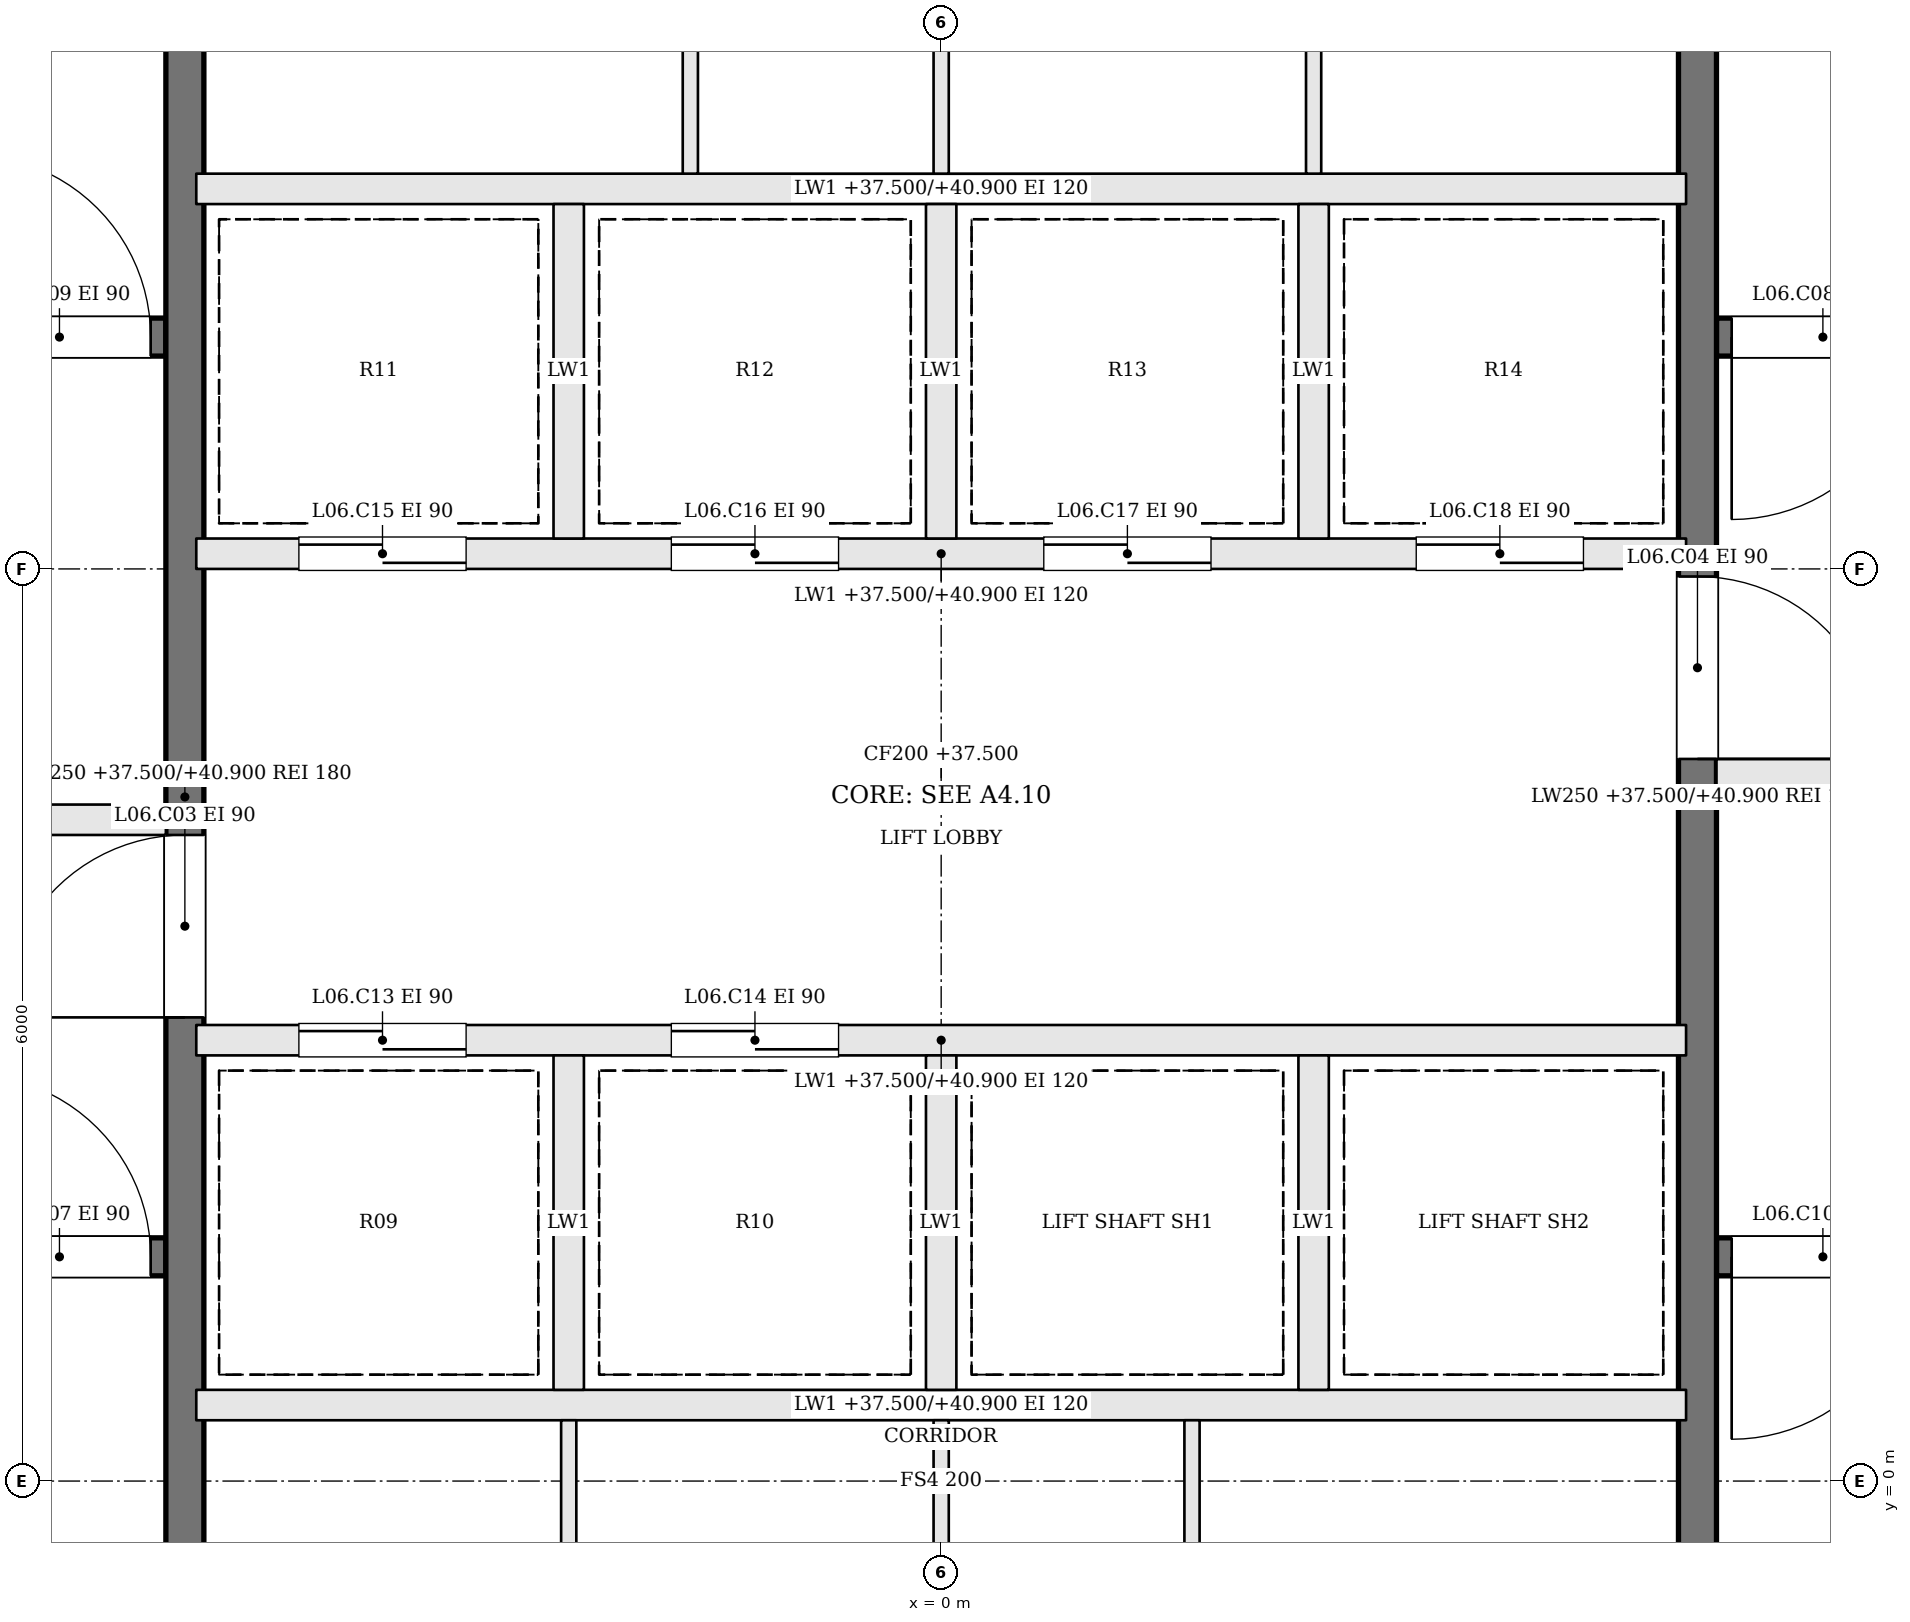
"""IFC4 building model, lengths in metres.
Left out: names, types, materials, properties, quantities, classifications, styles, units other than length and angle.
Written with IfcOpenShell. Run it as: python <this file> out.ifc"""

import sys

from ifc_helpers import new_model, si_unit, direction, frame, frame_2d, origin, place, context, subcontext, project, spatial, rectangle, extrude, element, fill, save


model = new_model("IFC4")
c1 = context("Model", 3, precision=1e-05, world=origin(), true_north=direction((0.0, 1.0)))
c2 = subcontext(c1, "Body", "Model", "MODEL_VIEW")
j1 = project(units=[si_unit("LENGTHUNIT", "METRE"), si_unit("PLANEANGLEUNIT", "RADIAN")], contexts=[c1])
p1 = place(None, origin())
s1 = spatial("IfcSite", under=j1, at=p1, CompositionType="ELEMENT")
p2 = place(p1, origin())
s2 = spatial("IfcBuilding", under=s1, at=p2, CompositionType="ELEMENT")
p3 = place(p2, frame((0.0, 0.0, 37.5)))
s3 = spatial("IfcBuildingStorey", under=s2, at=p3, CompositionType="ELEMENT", Elevation=37.5)
p4 = place(p3, frame((-11.6, 1.475, 0.0), z_axis=(0.0, 0.0, 1.0), x_axis=(1.0, 0.0, 0.0)))
e1 = element("IfcWall", 1, at=p4, inside=s3, PredefinedType="SOLIDWALL", context=c2, shape_type="SweptSolid", body=[
    extrude(rectangle(XDim=6.5, YDim=0.25, at=frame_2d((3.25, 0.0))), origin(), (0.0, 0.0, 1.0), 3.4),
])
p5 = place(p4, frame((5.2, 0.0, 0.0)))
e2 = element("IfcOpeningElement", 2, at=p5, cuts=e1, PredefinedType="OPENING", context=c2, shape_type="SweptSolid", body=[
    extrude(rectangle(XDim=1.2, YDim=2.1, at=frame_2d((0.6, 1.05))), frame((0.0, 0.135, 0.0), z_axis=(0.0, -1.0, 0.0), x_axis=(1.0, 0.0, 0.0)), (0.0, 0.0, 1.0), 0.27),
])
p6 = place(p3, frame((11.6, 7.525, 0.0), z_axis=(0.0, 0.0, 1.0), x_axis=(-1.0, 0.0, 0.0)))
e3 = element("IfcWall", 3, at=p6, inside=s3, PredefinedType="SOLIDWALL", context=c2, shape_type="SweptSolid", body=[
    extrude(rectangle(XDim=6.5, YDim=0.25, at=frame_2d((3.25, 0.0))), origin(), (0.0, 0.0, 1.0), 3.4),
])
p7 = place(p6, frame((5.2, 0.0, 0.0)))
e4 = element("IfcOpeningElement", 4, at=p7, cuts=e3, PredefinedType="OPENING", context=c2, shape_type="SweptSolid", body=[
    extrude(rectangle(XDim=1.2, YDim=2.1, at=frame_2d((0.6, 1.05))), frame((0.0, 0.135, 0.0), z_axis=(0.0, -1.0, 0.0), x_axis=(1.0, 0.0, 0.0)), (0.0, 0.0, 1.0), 0.27),
])
p8 = place(p3, frame((-11.6, 4.35, 0.0), z_axis=(0.0, 0.0, 1.0), x_axis=(1.0, 0.0, 0.0)))
e5 = element("IfcWall", 5, at=p8, inside=s3, PredefinedType="SOLIDWALL", context=c2, shape_type="SweptSolid", body=[
    extrude(rectangle(XDim=6.5, YDim=0.2, at=frame_2d((3.25, 0.0))), origin(), (0.0, 0.0, 1.0), 3.4),
])
p9 = place(p8, frame((3.8, 0.0, 0.0)))
e6 = element("IfcOpeningElement", 6, at=p9, cuts=e5, PredefinedType="OPENING", context=c2, shape_type="SweptSolid", body=[
    extrude(rectangle(XDim=1.2, YDim=2.1, at=frame_2d((0.6, 1.05))), frame((0.0, 0.11, 0.0), z_axis=(0.0, -1.0, 0.0), x_axis=(1.0, 0.0, 0.0)), (0.0, 0.0, 1.0), 0.22),
])
p10 = place(p8, frame((0.5, 0.0, 0.0)))
e7 = element("IfcOpeningElement", 7, at=p10, cuts=e5, PredefinedType="OPENING", context=c2, shape_type="SweptSolid", body=[
    extrude(rectangle(XDim=1.2, YDim=2.1, at=frame_2d((0.6, 1.05))), frame((0.0, 0.11, 0.0), z_axis=(0.0, -1.0, 0.0), x_axis=(1.0, 0.0, 0.0)), (0.0, 0.0, 1.0), 0.22),
])
p11 = place(p3, frame((11.6, 4.65, 0.0), z_axis=(0.0, 0.0, 1.0), x_axis=(-1.0, 0.0, 0.0)))
e8 = element("IfcWall", 8, at=p11, inside=s3, PredefinedType="SOLIDWALL", context=c2, shape_type="SweptSolid", body=[
    extrude(rectangle(XDim=6.5, YDim=0.2, at=frame_2d((3.25, 0.0))), origin(), (0.0, 0.0, 1.0), 3.4),
])
p12 = place(p11, frame((3.8, 0.0, 0.0)))
e9 = element("IfcOpeningElement", 9, at=p12, cuts=e8, PredefinedType="OPENING", context=c2, shape_type="SweptSolid", body=[
    extrude(rectangle(XDim=1.2, YDim=2.1, at=frame_2d((0.6, 1.05))), frame((0.0, 0.11, 0.0), z_axis=(0.0, -1.0, 0.0), x_axis=(1.0, 0.0, 0.0)), (0.0, 0.0, 1.0), 0.22),
])
p13 = place(p11, frame((0.5, 0.0, 0.0)))
e10 = element("IfcOpeningElement", 10, at=p13, cuts=e8, PredefinedType="OPENING", context=c2, shape_type="SweptSolid", body=[
    extrude(rectangle(XDim=1.2, YDim=2.1, at=frame_2d((0.6, 1.05))), frame((0.0, 0.11, 0.0), z_axis=(0.0, -1.0, 0.0), x_axis=(1.0, 0.0, 0.0)), (0.0, 0.0, 1.0), 0.22),
])
p14 = place(p3, frame((-11.6, 7.525, 0.0), z_axis=(0.0, 0.0, 1.0), x_axis=(1.0, 0.0, 0.0)))
e11 = element("IfcWall", 11, at=p14, inside=s3, PredefinedType="SOLIDWALL", context=c2, shape_type="SweptSolid", body=[
    extrude(rectangle(XDim=6.5, YDim=0.25, at=frame_2d((3.25, 0.0))), origin(), (0.0, 0.0, 1.0), 3.4),
])
p15 = place(p14, frame((5.2, 0.0, 0.0)))
e12 = element("IfcOpeningElement", 12, at=p15, cuts=e11, PredefinedType="OPENING", context=c2, shape_type="SweptSolid", body=[
    extrude(rectangle(XDim=1.2, YDim=2.1, at=frame_2d((0.6, 1.05))), frame((0.0, 0.135, 0.0), z_axis=(0.0, -1.0, 0.0), x_axis=(1.0, 0.0, 0.0)), (0.0, 0.0, 1.0), 0.27),
])
p16 = place(p3, frame((11.6, 1.475, 0.0), z_axis=(0.0, 0.0, 1.0), x_axis=(-1.0, 0.0, 0.0)))
e13 = element("IfcWall", 13, at=p16, inside=s3, PredefinedType="SOLIDWALL", context=c2, shape_type="SweptSolid", body=[
    extrude(rectangle(XDim=6.5, YDim=0.25, at=frame_2d((3.25, 0.0))), origin(), (0.0, 0.0, 1.0), 3.4),
])
p17 = place(p16, frame((5.2, 0.0, 0.0)))
e14 = element("IfcOpeningElement", 14, at=p17, cuts=e13, PredefinedType="OPENING", context=c2, shape_type="SweptSolid", body=[
    extrude(rectangle(XDim=1.2, YDim=2.1, at=frame_2d((0.6, 1.05))), frame((0.0, 0.135, 0.0), z_axis=(0.0, -1.0, 0.0), x_axis=(1.0, 0.0, 0.0)), (0.0, 0.0, 1.0), 0.27),
])
p18 = place(p3, frame((-4.975, -1.6, 0.0), z_axis=(0.0, 0.0, 1.0), x_axis=(0.0, 1.0, 0.0)))
e15 = element("IfcWall", 15, at=p18, inside=s3, PredefinedType="SOLIDWALL", context=c2, shape_type="SweptSolid", body=[
    extrude(rectangle(XDim=12.2, YDim=0.25, at=frame_2d((6.1, 0.0))), origin(), (0.0, 0.0, 1.0), 3.4),
])
p19 = place(p18, frame((4.65, 0.0, 0.0)))
e16 = element("IfcOpeningElement", 16, at=p19, cuts=e15, PredefinedType="OPENING", context=c2, shape_type="SweptSolid", body=[
    extrude(rectangle(XDim=1.2, YDim=2.1, at=frame_2d((0.6, 1.05))), frame((0.0, 0.135, 0.0), z_axis=(0.0, -1.0, 0.0), x_axis=(1.0, 0.0, 0.0)), (0.0, 0.0, 1.0), 0.27),
])
p20 = place(p3, frame((4.975, 10.6, 0.0), z_axis=(0.0, 0.0, 1.0), x_axis=(0.0, -1.0, 0.0)))
e17 = element("IfcWall", 17, at=p20, inside=s3, PredefinedType="SOLIDWALL", context=c2, shape_type="SweptSolid", body=[
    extrude(rectangle(XDim=12.2, YDim=0.25, at=frame_2d((6.1, 0.0))), origin(), (0.0, 0.0, 1.0), 3.4),
])
p21 = place(p20, frame((4.65, 0.0, 0.0)))
e18 = element("IfcOpeningElement", 18, at=p21, cuts=e17, PredefinedType="OPENING", context=c2, shape_type="SweptSolid", body=[
    extrude(rectangle(XDim=1.2, YDim=2.1, at=frame_2d((0.6, 1.05))), frame((0.0, 0.135, 0.0), z_axis=(0.0, -1.0, 0.0), x_axis=(1.0, 0.0, 0.0)), (0.0, 0.0, 1.0), 0.27),
])
p22 = place(p3, frame((-4.9, 0.5, 0.0), z_axis=(0.0, 0.0, 1.0), x_axis=(1.0, 0.0, 0.0)))
e19 = element("IfcWall", 19, at=p22, inside=s3, PredefinedType="SOLIDWALL", context=c2, shape_type="SweptSolid", body=[
    extrude(rectangle(XDim=9.8, YDim=0.2, at=frame_2d((4.9, 0.0))), origin(), (0.0, 0.0, 1.0), 3.4),
])
p23 = place(p3, frame((-4.9, 2.9, 0.0), z_axis=(0.0, 0.0, 1.0), x_axis=(1.0, 0.0, 0.0)))
e20 = element("IfcWall", 20, at=p23, inside=s3, PredefinedType="SOLIDWALL", context=c2, shape_type="SweptSolid", body=[
    extrude(rectangle(XDim=9.8, YDim=0.2, at=frame_2d((4.9, 0.0))), origin(), (0.0, 0.0, 1.0), 3.4),
])
p24 = place(p23, frame((0.675, 0.0, 0.0)))
e21 = element("IfcOpeningElement", 21, at=p24, cuts=e20, PredefinedType="OPENING", context=c2, shape_type="SweptSolid", body=[
    extrude(rectangle(XDim=1.1, YDim=2.1, at=frame_2d((0.55, 1.05))), frame((0.0, 0.11, 0.0), z_axis=(0.0, -1.0, 0.0), x_axis=(1.0, 0.0, 0.0)), (0.0, 0.0, 1.0), 0.22),
])
p25 = place(p23, frame((3.125, 0.0, 0.0)))
e22 = element("IfcOpeningElement", 22, at=p25, cuts=e20, PredefinedType="OPENING", context=c2, shape_type="SweptSolid", body=[
    extrude(rectangle(XDim=1.1, YDim=2.1, at=frame_2d((0.55, 1.05))), frame((0.0, 0.11, 0.0), z_axis=(0.0, -1.0, 0.0), x_axis=(1.0, 0.0, 0.0)), (0.0, 0.0, 1.0), 0.22),
])
p26 = place(p3, frame((-4.9, 6.1, 0.0), z_axis=(0.0, 0.0, 1.0), x_axis=(1.0, 0.0, 0.0)))
e23 = element("IfcWall", 23, at=p26, inside=s3, PredefinedType="SOLIDWALL", context=c2, shape_type="SweptSolid", body=[
    extrude(rectangle(XDim=9.8, YDim=0.2, at=frame_2d((4.9, 0.0))), origin(), (0.0, 0.0, 1.0), 3.4),
])
p27 = place(p26, frame((0.675, 0.0, 0.0)))
e24 = element("IfcOpeningElement", 24, at=p27, cuts=e23, PredefinedType="OPENING", context=c2, shape_type="SweptSolid", body=[
    extrude(rectangle(XDim=1.1, YDim=2.1, at=frame_2d((0.55, 1.05))), frame((0.0, 0.11, 0.0), z_axis=(0.0, -1.0, 0.0), x_axis=(1.0, 0.0, 0.0)), (0.0, 0.0, 1.0), 0.22),
])
p28 = place(p26, frame((3.125, 0.0, 0.0)))
e25 = element("IfcOpeningElement", 25, at=p28, cuts=e23, PredefinedType="OPENING", context=c2, shape_type="SweptSolid", body=[
    extrude(rectangle(XDim=1.1, YDim=2.1, at=frame_2d((0.55, 1.05))), frame((0.0, 0.11, 0.0), z_axis=(0.0, -1.0, 0.0), x_axis=(1.0, 0.0, 0.0)), (0.0, 0.0, 1.0), 0.22),
])
p29 = place(p26, frame((5.575, 0.0, 0.0)))
e26 = element("IfcOpeningElement", 26, at=p29, cuts=e23, PredefinedType="OPENING", context=c2, shape_type="SweptSolid", body=[
    extrude(rectangle(XDim=1.1, YDim=2.1, at=frame_2d((0.55, 1.05))), frame((0.0, 0.11, 0.0), z_axis=(0.0, -1.0, 0.0), x_axis=(1.0, 0.0, 0.0)), (0.0, 0.0, 1.0), 0.22),
])
p30 = place(p26, frame((8.025, 0.0, 0.0)))
e27 = element("IfcOpeningElement", 27, at=p30, cuts=e23, PredefinedType="OPENING", context=c2, shape_type="SweptSolid", body=[
    extrude(rectangle(XDim=1.1, YDim=2.1, at=frame_2d((0.55, 1.05))), frame((0.0, 0.11, 0.0), z_axis=(0.0, -1.0, 0.0), x_axis=(1.0, 0.0, 0.0)), (0.0, 0.0, 1.0), 0.22),
])
p31 = place(p3, frame((-4.9, 8.5, 0.0), z_axis=(0.0, 0.0, 1.0), x_axis=(1.0, 0.0, 0.0)))
e28 = element("IfcWall", 28, at=p31, inside=s3, PredefinedType="SOLIDWALL", context=c2, shape_type="SweptSolid", body=[
    extrude(rectangle(XDim=9.8, YDim=0.2, at=frame_2d((4.9, 0.0))), origin(), (0.0, 0.0, 1.0), 3.4),
])
for number, where, z_axis, x_axis in (
    (29, (-2.45, 0.6, 0.0), (0.0, 0.0, 1.0), (0.0, 1.0, 0.0)),
    (30, (0.0, 0.6, 0.0), (0.0, 0.0, 1.0), (0.0, 1.0, 0.0)),
    (31, (2.45, 0.6, 0.0), (0.0, 0.0, 1.0), (0.0, 1.0, 0.0)),
    (32, (-2.45, 6.2, 0.0), (0.0, 0.0, 1.0), (0.0, 1.0, 0.0)),
    (33, (0.0, 6.2, 0.0), (0.0, 0.0, 1.0), (0.0, 1.0, 0.0)),
    (34, (2.45, 6.2, 0.0), (0.0, 0.0, 1.0), (0.0, 1.0, 0.0)),
):
    element("IfcWall", number, at=place(p3, frame(where, z_axis=z_axis, x_axis=x_axis)), inside=s3, PredefinedType="SOLIDWALL", context=c2, shape_type="SweptSolid", body=[
        extrude(rectangle(XDim=2.2, YDim=0.2, at=frame_2d((1.1, 0.0))), origin(), (0.0, 0.0, 1.0), 3.4),
    ])
for number, where, z_axis, x_axis in (
    (35, (-2.45, -1.6, 0.0), (0.0, 0.0, 1.0), (0.0, 1.0, 0.0)),
    (36, (0.0, -1.6, 0.0), (0.0, 0.0, 1.0), (0.0, 1.0, 0.0)),
    (37, (1.65, -1.6, 0.0), (0.0, 0.0, 1.0), (0.0, 1.0, 0.0)),
    (38, (-1.65, 8.6, 0.0), (0.0, 0.0, 1.0), (0.0, 1.0, 0.0)),
    (39, (0.0, 8.6, 0.0), (0.0, 0.0, 1.0), (0.0, 1.0, 0.0)),
    (40, (2.45, 8.6, 0.0), (0.0, 0.0, 1.0), (0.0, 1.0, 0.0)),
):
    element("IfcWall", number, at=place(p3, frame(where, z_axis=z_axis, x_axis=x_axis)), inside=s3, PredefinedType="PARTITIONING", context=c2, shape_type="SweptSolid", body=[
        extrude(rectangle(XDim=2.0, YDim=0.1, at=frame_2d((1.0, 0.0))), origin(), (0.0, 0.0, 1.0), 3.4),
    ])
p32 = place(p19, origin())
e41 = element("IfcDoor", 41, at=p32, inside=s3, OperationType="SINGLE_SWING_LEFT", PredefinedType="DOOR", context=c2, shape_type="SweptSolid", body=[
    extrude(rectangle(XDim=1.2, YDim=2.1, at=frame_2d((0.6, 1.05))), frame((0.0, 0.025, 0.0), z_axis=(0.0, -1.0, 0.0), x_axis=(1.0, 0.0, 0.0)), (0.0, 0.0, 1.0), 0.05),
])
fill(e16, e41)
p33 = place(p21, origin())
e42 = element("IfcDoor", 42, at=p33, inside=s3, OperationType="SINGLE_SWING_RIGHT", PredefinedType="DOOR", context=c2, shape_type="SweptSolid", body=[
    extrude(rectangle(XDim=1.2, YDim=2.1, at=frame_2d((0.6, 1.05))), frame((0.0, 0.025, 0.0), z_axis=(0.0, -1.0, 0.0), x_axis=(1.0, 0.0, 0.0)), (0.0, 0.0, 1.0), 0.05),
])
fill(e18, e42)
p34 = place(p5, origin())
e43 = element("IfcDoor", 43, at=p34, inside=s3, OperationType="SINGLE_SWING_LEFT", PredefinedType="DOOR", context=c2, shape_type="SweptSolid", body=[
    extrude(rectangle(XDim=1.2, YDim=2.1, at=frame_2d((0.6, 1.05))), frame((0.0, 0.025, 0.0), z_axis=(0.0, -1.0, 0.0), x_axis=(1.0, 0.0, 0.0)), (0.0, 0.0, 1.0), 0.05),
])
fill(e2, e43)
p35 = place(p7, origin())
e44 = element("IfcDoor", 44, at=p35, inside=s3, OperationType="SINGLE_SWING_RIGHT", PredefinedType="DOOR", context=c2, shape_type="SweptSolid", body=[
    extrude(rectangle(XDim=1.2, YDim=2.1, at=frame_2d((0.6, 1.05))), frame((0.0, 0.025, 0.0), z_axis=(0.0, -1.0, 0.0), x_axis=(1.0, 0.0, 0.0)), (0.0, 0.0, 1.0), 0.05),
])
fill(e4, e44)
p36 = place(p15, origin())
e45 = element("IfcDoor", 45, at=p36, inside=s3, OperationType="SINGLE_SWING_LEFT", PredefinedType="DOOR", context=c2, shape_type="SweptSolid", body=[
    extrude(rectangle(XDim=1.2, YDim=2.1, at=frame_2d((0.6, 1.05))), frame((0.0, 0.025, 0.0), z_axis=(0.0, -1.0, 0.0), x_axis=(1.0, 0.0, 0.0)), (0.0, 0.0, 1.0), 0.05),
])
fill(e12, e45)
p37 = place(p17, origin())
e46 = element("IfcDoor", 46, at=p37, inside=s3, OperationType="SINGLE_SWING_RIGHT", PredefinedType="DOOR", context=c2, shape_type="SweptSolid", body=[
    extrude(rectangle(XDim=1.2, YDim=2.1, at=frame_2d((0.6, 1.05))), frame((0.0, 0.025, 0.0), z_axis=(0.0, -1.0, 0.0), x_axis=(1.0, 0.0, 0.0)), (0.0, 0.0, 1.0), 0.05),
])
fill(e14, e46)
p38 = place(p24, origin())
e47 = element("IfcDoor", 47, at=p38, inside=s3, OperationType="SLIDING_TO_RIGHT", PredefinedType="DOOR", context=c2, shape_type="SweptSolid", body=[
    extrude(rectangle(XDim=1.1, YDim=2.1, at=frame_2d((0.55, 1.05))), frame((0.0, 0.025, 0.0), z_axis=(0.0, -1.0, 0.0), x_axis=(1.0, 0.0, 0.0)), (0.0, 0.0, 1.0), 0.05),
])
fill(e21, e47)
p39 = place(p25, origin())
e48 = element("IfcDoor", 48, at=p39, inside=s3, OperationType="SLIDING_TO_LEFT", PredefinedType="DOOR", context=c2, shape_type="SweptSolid", body=[
    extrude(rectangle(XDim=1.1, YDim=2.1, at=frame_2d((0.55, 1.05))), frame((0.0, 0.025, 0.0), z_axis=(0.0, -1.0, 0.0), x_axis=(1.0, 0.0, 0.0)), (0.0, 0.0, 1.0), 0.05),
])
fill(e22, e48)
p40 = place(p27, origin())
e49 = element("IfcDoor", 49, at=p40, inside=s3, OperationType="SLIDING_TO_RIGHT", PredefinedType="DOOR", context=c2, shape_type="SweptSolid", body=[
    extrude(rectangle(XDim=1.1, YDim=2.1, at=frame_2d((0.55, 1.05))), frame((0.0, 0.025, 0.0), z_axis=(0.0, -1.0, 0.0), x_axis=(1.0, 0.0, 0.0)), (0.0, 0.0, 1.0), 0.05),
])
fill(e24, e49)
p41 = place(p28, origin())
e50 = element("IfcDoor", 50, at=p41, inside=s3, OperationType="SLIDING_TO_LEFT", PredefinedType="DOOR", context=c2, shape_type="SweptSolid", body=[
    extrude(rectangle(XDim=1.1, YDim=2.1, at=frame_2d((0.55, 1.05))), frame((0.0, 0.025, 0.0), z_axis=(0.0, -1.0, 0.0), x_axis=(1.0, 0.0, 0.0)), (0.0, 0.0, 1.0), 0.05),
])
fill(e25, e50)
p42 = place(p29, origin())
e51 = element("IfcDoor", 51, at=p42, inside=s3, OperationType="SLIDING_TO_RIGHT", PredefinedType="DOOR", context=c2, shape_type="SweptSolid", body=[
    extrude(rectangle(XDim=1.1, YDim=2.1, at=frame_2d((0.55, 1.05))), frame((0.0, 0.025, 0.0), z_axis=(0.0, -1.0, 0.0), x_axis=(1.0, 0.0, 0.0)), (0.0, 0.0, 1.0), 0.05),
])
fill(e26, e51)
p43 = place(p30, origin())
e52 = element("IfcDoor", 52, at=p43, inside=s3, OperationType="SLIDING_TO_LEFT", PredefinedType="DOOR", context=c2, shape_type="SweptSolid", body=[
    extrude(rectangle(XDim=1.1, YDim=2.1, at=frame_2d((0.55, 1.05))), frame((0.0, 0.025, 0.0), z_axis=(0.0, -1.0, 0.0), x_axis=(1.0, 0.0, 0.0)), (0.0, 0.0, 1.0), 0.05),
])
fill(e27, e52)
save(model, sys.argv[1])
